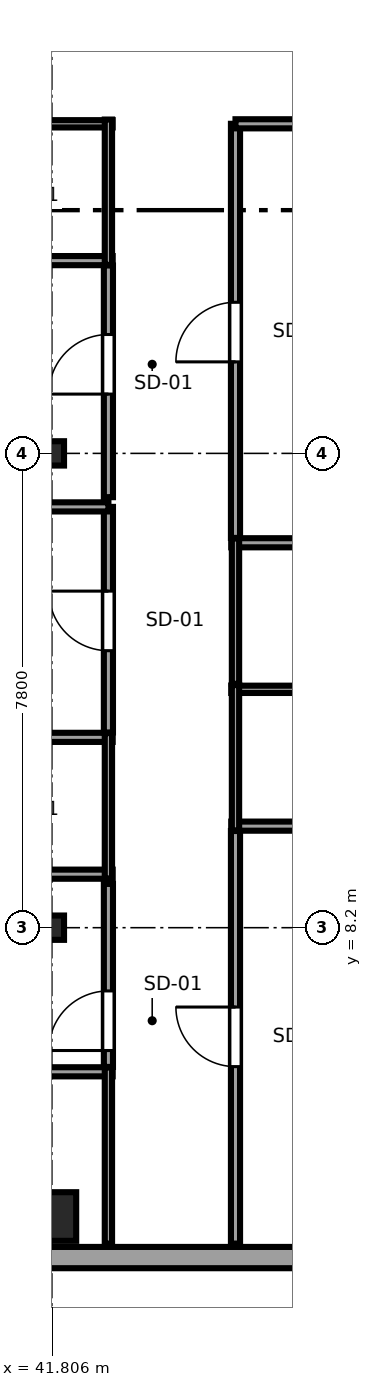
"""IFC4 building model, lengths in metres.
Left out: names, types, materials, properties, quantities, classifications, styles, units other than length and angle.
Written with IfcOpenShell. Run it as: python <this file> out.ifc"""

import sys

from ifc_helpers import new_model, si_unit, direction, frame, frame_2d, origin, origin_2d, place, context, subcontext, project, spatial, rectangle, i_section, extrude, source, transform, mapped, element, fill, save


model = new_model("IFC4")
c1 = context("Model", 3, precision=1e-05, world=origin(), true_north=direction((0.0, 1.0)))
c2 = subcontext(c1, "Body", "Model", "MODEL_VIEW")
j1 = project(units=[si_unit("LENGTHUNIT", "METRE"), si_unit("PLANEANGLEUNIT", "RADIAN")], contexts=[c1])
p1 = place(None, origin())
s1 = spatial("IfcSite", under=j1, at=p1, CompositionType="ELEMENT")
p2 = place(p1, origin())
s2 = spatial("IfcBuilding", under=s1, at=p2, CompositionType="ELEMENT")
p3 = place(p2, frame((0.0, 0.0, 198.2)))
s3 = spatial("IfcBuildingStorey", under=s2, at=p3, CompositionType="ELEMENT", Elevation=198.2)
m1 = source(origin(), c2, "Body", "SweptSolid", [
    extrude(rectangle(XDim=0.8, YDim=0.8, at=origin_2d()), origin(), (0.0, 0.0, 1.0), 3.55),
])
p4 = place(p3, frame((41.8, 3.45, 0.0), z_axis=(0.0, 0.0, 1.0), x_axis=(1.0, 0.0, 0.0)))
e1 = element("IfcColumn", 1, at=p4, inside=s3, PredefinedType="COLUMN", context=c2, shape_type="MappedRepresentation", body=[
    mapped(m1, transform((0.0, 0.0, 0.0), x_axis=(1.0, 0.0, 0.0), y_axis=(0.0, 1.0, 0.0), z_axis=(0.0, 0.0, 1.0), scale=1.0)),
])
m2 = source(origin(), c2, "Body", "SweptSolid", [
    extrude(i_section(OverallWidth=0.4, OverallDepth=0.4, WebThickness=0.02, FlangeThickness=0.035, at=origin_2d()), origin(), (0.0, 0.0, 1.0), 3.55),
])
for number, where, z_axis, x_axis in (
    (2, (41.8, 8.2, 0.0), (0.0, 0.0, 1.0), (1.0, 0.0, 0.0)),
    (3, (41.8, 16.0, 0.0), (0.0, 0.0, 1.0), (1.0, 0.0, 0.0)),
):
    element("IfcColumn", number, at=place(p3, frame(where, z_axis=z_axis, x_axis=x_axis)), inside=s3, PredefinedType="COLUMN", context=c2, shape_type="MappedRepresentation", body=[
        mapped(m2, transform((0.0, 0.0, 0.0), x_axis=(1.0, 0.0, 0.0), y_axis=(0.0, 1.0, 0.0), z_axis=(0.0, 0.0, 1.0), scale=1.0)),
    ])
p5 = place(p3, frame((34.375, 2.775, 0.0), z_axis=(0.0, 0.0, 1.0), x_axis=(1.0, 0.0, 0.0)))
e4 = element("IfcWall", 4, at=p5, inside=s3, PredefinedType="SOLIDWALL", context=c2, shape_type="SweptSolid", body=[
    extrude(rectangle(XDim=15.608, YDim=0.35, at=frame_2d((7.804, 0.0))), origin(), (0.0, 0.0, 1.0), 3.37),
])
p6 = place(p5, frame((1.801, 0.0, 0.68)))
e5 = element("IfcOpeningElement", 5, at=p6, cuts=e4, PredefinedType="OPENING", context=c2, shape_type="SweptSolid", body=[
    extrude(rectangle(XDim=2.4, YDim=1.9, at=frame_2d((1.2, 0.95))), frame((0.0, 0.185, 0.0), z_axis=(0.0, -1.0, 0.0), x_axis=(1.0, 0.0, 0.0)), (0.0, 0.0, 1.0), 0.37),
])
p7 = place(p5, frame((11.406, 0.0, 0.68)))
e6 = element("IfcOpeningElement", 6, at=p7, cuts=e4, PredefinedType="OPENING", context=c2, shape_type="SweptSolid", body=[
    extrude(rectangle(XDim=2.4, YDim=1.9, at=frame_2d((1.2, 0.95))), frame((0.0, 0.185, 0.0), z_axis=(0.0, -1.0, 0.0), x_axis=(1.0, 0.0, 0.0)), (0.0, 0.0, 1.0), 0.37),
])
p8 = place(p3, frame((39.06, 5.83, 0.0), z_axis=(0.0, 0.0, 1.0), x_axis=(1.0, 0.0, 0.0)))
e7 = element("IfcWall", 7, at=p8, inside=s3, PredefinedType="PARTITIONING", context=c2, shape_type="SweptSolid", body=[
    extrude(rectangle(XDim=3.74, YDim=0.15, at=frame_2d((1.87, 0.0))), origin(), (0.0, 0.0, 1.0), 3.37),
])
p9 = place(p3, frame((42.73, 3.005, 0.0), z_axis=(0.0, 0.0, 1.0), x_axis=(0.0, 1.0, 0.0)))
e8 = element("IfcWall", 8, at=p9, inside=s3, PredefinedType="PLUMBINGWALL", context=c2, shape_type="SweptSolid", body=[
    extrude(rectangle(XDim=2.895, YDim=0.12, at=frame_2d((1.448, 0.0))), origin(), (0.0, 0.0, 1.0), 3.37),
])
p10 = place(p3, frame((34.65, 9.08, 0.0), z_axis=(0.0, 0.0, 1.0), x_axis=(1.0, 0.0, 0.0)))
e9 = element("IfcWall", 9, at=p10, inside=s3, PredefinedType="PARTITIONING", context=c2, shape_type="SweptSolid", body=[
    extrude(rectangle(XDim=8.15, YDim=0.15, at=frame_2d((4.075, 0.0))), origin(), (0.0, 0.0, 1.0), 3.37),
])
p11 = place(p3, frame((40.21, 11.33, 0.0), z_axis=(0.0, 0.0, 1.0), x_axis=(1.0, 0.0, 0.0)))
e10 = element("IfcWall", 10, at=p11, inside=s3, PredefinedType="PARTITIONING", context=c2, shape_type="SweptSolid", body=[
    extrude(rectangle(XDim=2.59, YDim=0.15, at=frame_2d((1.295, 0.0))), origin(), (0.0, 0.0, 1.0), 3.37),
])
p12 = place(p3, frame((42.73, 9.01, 0.0), z_axis=(0.0, 0.0, 1.0), x_axis=(0.0, 1.0, 0.0)))
e11 = element("IfcWall", 11, at=p12, inside=s3, PredefinedType="PLUMBINGWALL", context=c2, shape_type="SweptSolid", body=[
    extrude(rectangle(XDim=2.39, YDim=0.12, at=frame_2d((1.195, 0.0))), origin(), (0.0, 0.0, 1.0), 3.37),
])
p13 = place(p3, frame((40.21, 19.17, 0.0), z_axis=(0.0, 0.0, 1.0), x_axis=(1.0, 0.0, 0.0)))
e12 = element("IfcWall", 12, at=p13, inside=s3, PredefinedType="PARTITIONING", context=c2, shape_type="SweptSolid", body=[
    extrude(rectangle(XDim=2.59, YDim=0.15, at=frame_2d((1.295, 0.0))), origin(), (0.0, 0.0, 1.0), 3.37),
])
p14 = place(p3, frame((40.21, 21.42, 0.0), z_axis=(0.0, 0.0, 1.0), x_axis=(1.0, 0.0, 0.0)))
e13 = element("IfcWall", 13, at=p14, inside=s3, PredefinedType="PLUMBINGWALL", context=c2, shape_type="SweptSolid", body=[
    extrude(rectangle(XDim=2.59, YDim=0.12, at=frame_2d((1.295, 0.0))), origin(), (0.0, 0.0, 1.0), 3.37),
])
p15 = place(p3, frame((42.73, 19.1, 0.0), z_axis=(0.0, 0.0, 1.0), x_axis=(0.0, 1.0, 0.0)))
e14 = element("IfcWall", 14, at=p15, inside=s3, PredefinedType="PLUMBINGWALL", context=c2, shape_type="SweptSolid", body=[
    extrude(rectangle(XDim=2.39, YDim=0.12, at=frame_2d((1.195, 0.0))), origin(), (0.0, 0.0, 1.0), 3.37),
])
p16 = place(p3, frame((44.75, 9.87, 0.0), z_axis=(0.0, 0.0, 1.0), x_axis=(1.0, 0.0, 0.0)))
e15 = element("IfcWall", 15, at=p16, inside=s3, PredefinedType="PARTITIONING", context=c2, shape_type="SweptSolid", body=[
    extrude(rectangle(XDim=2.59, YDim=0.15, at=frame_2d((1.295, 0.0))), origin(), (0.0, 0.0, 1.0), 3.37),
])
p17 = place(p3, frame((44.75, 12.12, 0.0), z_axis=(0.0, 0.0, 1.0), x_axis=(1.0, 0.0, 0.0)))
e16 = element("IfcWall", 16, at=p17, inside=s3, PredefinedType="PLUMBINGWALL", context=c2, shape_type="SweptSolid", body=[
    extrude(rectangle(XDim=2.59, YDim=0.12, at=frame_2d((1.295, 0.0))), origin(), (0.0, 0.0, 1.0), 3.37),
])
p18 = place(p3, frame((44.82, 9.8, 0.0), z_axis=(0.0, 0.0, 1.0), x_axis=(0.0, 1.0, 0.0)))
e17 = element("IfcWall", 17, at=p18, inside=s3, PredefinedType="PLUMBINGWALL", context=c2, shape_type="SweptSolid", body=[
    extrude(rectangle(XDim=2.39, YDim=0.12, at=frame_2d((1.195, 0.0))), origin(), (0.0, 0.0, 1.0), 3.37),
])
p19 = place(p3, frame((44.75, 14.53, 0.0), z_axis=(0.0, 0.0, 1.0), x_axis=(1.0, 0.0, 0.0)))
e18 = element("IfcWall", 18, at=p19, inside=s3, PredefinedType="PARTITIONING", context=c2, shape_type="SweptSolid", body=[
    extrude(rectangle(XDim=2.59, YDim=0.15, at=frame_2d((1.295, 0.0))), origin(), (0.0, 0.0, 1.0), 3.37),
])
p20 = place(p3, frame((44.82, 12.21, 0.0), z_axis=(0.0, 0.0, 1.0), x_axis=(0.0, 1.0, 0.0)))
e19 = element("IfcWall", 19, at=p20, inside=s3, PredefinedType="PLUMBINGWALL", context=c2, shape_type="SweptSolid", body=[
    extrude(rectangle(XDim=2.39, YDim=0.12, at=frame_2d((1.195, 0.0))), origin(), (0.0, 0.0, 1.0), 3.37),
])
p21 = place(p3, frame((42.73, 5.91, 0.0), z_axis=(0.0, 0.0, 1.0), x_axis=(0.0, 1.0, 0.0)))
e20 = element("IfcWall", 20, at=p21, inside=s3, PredefinedType="PARTITIONING", context=c2, shape_type="SweptSolid", body=[
    extrude(rectangle(XDim=3.01, YDim=0.15, at=frame_2d((1.505, 0.0))), origin(), (0.0, 0.0, 1.0), 3.37),
])
p22 = place(p21, frame((0.27, 0.0, 0.0)))
e21 = element("IfcOpeningElement", 21, at=p22, cuts=e20, PredefinedType="OPENING", context=c2, shape_type="SweptSolid", body=[
    extrude(rectangle(XDim=0.98, YDim=2.12, at=frame_2d((0.49, 1.06))), frame((0.0, 0.085, 0.0), z_axis=(0.0, -1.0, 0.0), x_axis=(1.0, 0.0, 0.0)), (0.0, 0.0, 1.0), 0.17),
])
p23 = place(p3, frame((42.73, 11.41, 0.0), z_axis=(0.0, 0.0, 1.0), x_axis=(0.0, 1.0, 0.0)))
e22 = element("IfcWall", 22, at=p23, inside=s3, PredefinedType="PARTITIONING", context=c2, shape_type="SweptSolid", body=[
    extrude(rectangle(XDim=3.71, YDim=0.15, at=frame_2d((1.855, 0.0))), origin(), (0.0, 0.0, 1.0), 3.37),
])
p24 = place(p23, frame((1.345, 0.0, 0.0)))
e23 = element("IfcOpeningElement", 23, at=p24, cuts=e22, PredefinedType="OPENING", context=c2, shape_type="SweptSolid", body=[
    extrude(rectangle(XDim=0.98, YDim=2.12, at=frame_2d((0.49, 1.06))), frame((0.0, 0.085, 0.0), z_axis=(0.0, -1.0, 0.0), x_axis=(1.0, 0.0, 0.0)), (0.0, 0.0, 1.0), 0.17),
])
p25 = place(p3, frame((34.65, 15.12, 0.0), z_axis=(0.0, 0.0, 1.0), x_axis=(1.0, 0.0, 0.0)))
e24 = element("IfcWall", 24, at=p25, inside=s3, PredefinedType="PARTITIONING", context=c2, shape_type="SweptSolid", body=[
    extrude(rectangle(XDim=8.08, YDim=0.15, at=frame_2d((4.04, 0.0))), origin(), (0.0, 0.0, 1.0), 3.37),
])
p26 = place(p3, frame((42.73, 15.28, 0.0), z_axis=(0.0, 0.0, 1.0), x_axis=(0.0, 1.0, 0.0)))
e25 = element("IfcWall", 25, at=p26, inside=s3, PredefinedType="PARTITIONING", context=c2, shape_type="SweptSolid", body=[
    extrude(rectangle(XDim=3.81, YDim=0.15, at=frame_2d((1.905, 0.0))), origin(), (0.0, 0.0, 1.0), 3.37),
])
p27 = place(p26, frame((1.695, 0.0, 0.0)))
e26 = element("IfcOpeningElement", 26, at=p27, cuts=e25, PredefinedType="OPENING", context=c2, shape_type="SweptSolid", body=[
    extrude(rectangle(XDim=0.98, YDim=2.12, at=frame_2d((0.49, 1.06))), frame((0.0, 0.085, 0.0), z_axis=(0.0, -1.0, 0.0), x_axis=(1.0, 0.0, 0.0)), (0.0, 0.0, 1.0), 0.17),
])
p28 = place(p3, frame((44.82, 3.005, 0.0), z_axis=(0.0, 0.0, 1.0), x_axis=(0.0, 1.0, 0.0)))
e27 = element("IfcWall", 27, at=p28, inside=s3, PredefinedType="PARTITIONING", context=c2, shape_type="SweptSolid", body=[
    extrude(rectangle(XDim=6.785, YDim=0.15, at=frame_2d((3.393, 0.0))), origin(), (0.0, 0.0, 1.0), 3.37),
])
p29 = place(p28, frame((2.91, 0.0, 0.0)))
e28 = element("IfcOpeningElement", 28, at=p29, cuts=e27, PredefinedType="OPENING", context=c2, shape_type="SweptSolid", body=[
    extrude(rectangle(XDim=0.98, YDim=2.12, at=frame_2d((0.49, 1.06))), frame((0.0, 0.085, 0.0), z_axis=(0.0, -1.0, 0.0), x_axis=(1.0, 0.0, 0.0)), (0.0, 0.0, 1.0), 0.17),
])
p30 = place(p3, frame((44.82, 14.61, 0.0), z_axis=(0.0, 0.0, 1.0), x_axis=(0.0, 1.0, 0.0)))
e29 = element("IfcWall", 29, at=p30, inside=s3, PredefinedType="PARTITIONING", context=c2, shape_type="SweptSolid", body=[
    extrude(rectangle(XDim=6.81, YDim=0.15, at=frame_2d((3.405, 0.0))), origin(), (0.0, 0.0, 1.0), 3.37),
])
p31 = place(p30, frame((2.895, 0.0, 0.0)))
e30 = element("IfcOpeningElement", 30, at=p31, cuts=e29, PredefinedType="OPENING", context=c2, shape_type="SweptSolid", body=[
    extrude(rectangle(XDim=0.98, YDim=2.12, at=frame_2d((0.49, 1.06))), frame((0.0, 0.085, 0.0), z_axis=(0.0, -1.0, 0.0), x_axis=(1.0, 0.0, 0.0)), (0.0, 0.0, 1.0), 0.17),
])
p32 = place(p3, frame((44.82, 21.42, 0.0), z_axis=(0.0, 0.0, 1.0), x_axis=(1.0, 0.0, 0.0)))
e31 = element("IfcWall", 31, at=p32, inside=s3, PredefinedType="PARTITIONING", context=c2, shape_type="SweptSolid", body=[
    extrude(rectangle(XDim=9.175, YDim=0.15, at=frame_2d((4.587, 0.0))), origin(), (0.0, 0.0, 1.0), 3.37),
])
m3 = source(origin(), c2, "Body", "SweptSolid", [
    extrude(rectangle(XDim=0.98, YDim=2.12, at=frame_2d((0.49, 1.06))), frame((0.0, 0.025, 0.0), z_axis=(0.0, -1.0, 0.0), x_axis=(1.0, 0.0, 0.0)), (0.0, 0.0, 1.0), 0.05),
])
p33 = place(p22, origin())
e32 = element("IfcDoor", 32, at=p33, inside=s3, OperationType="SINGLE_SWING_LEFT", PredefinedType="DOOR", context=c2, shape_type="MappedRepresentation", body=[
    mapped(m3, transform((0.0, 0.0, 0.0), x_axis=(1.0, 0.0, 0.0), y_axis=(0.0, 1.0, 0.0), z_axis=(0.0, 0.0, 1.0), scale=1.0)),
])
fill(e21, e32)
p34 = place(p24, origin())
e33 = element("IfcDoor", 33, at=p34, inside=s3, OperationType="SINGLE_SWING_RIGHT", PredefinedType="DOOR", context=c2, shape_type="MappedRepresentation", body=[
    mapped(m3, transform((0.0, 0.0, 0.0), x_axis=(1.0, 0.0, 0.0), y_axis=(0.0, 1.0, 0.0), z_axis=(0.0, 0.0, 1.0), scale=1.0)),
])
fill(e23, e33)
p35 = place(p27, origin())
e34 = element("IfcDoor", 34, at=p35, inside=s3, OperationType="SINGLE_SWING_LEFT", PredefinedType="DOOR", context=c2, shape_type="MappedRepresentation", body=[
    mapped(m3, transform((0.0, 0.0, 0.0), x_axis=(1.0, 0.0, 0.0), y_axis=(0.0, 1.0, 0.0), z_axis=(0.0, 0.0, 1.0), scale=1.0)),
])
fill(e26, e34)
p36 = place(p29, origin())
e35 = element("IfcDoor", 35, at=p36, inside=s3, OperationType="SINGLE_SWING_RIGHT", PredefinedType="DOOR", context=c2, shape_type="MappedRepresentation", body=[
    mapped(m3, transform((0.0, 0.0, 0.0), x_axis=(1.0, 0.0, 0.0), y_axis=(0.0, 1.0, 0.0), z_axis=(0.0, 0.0, 1.0), scale=1.0)),
])
fill(e28, e35)
p37 = place(p31, origin())
e36 = element("IfcDoor", 36, at=p37, inside=s3, OperationType="SINGLE_SWING_LEFT", PredefinedType="DOOR", context=c2, shape_type="MappedRepresentation", body=[
    mapped(m3, transform((0.0, 0.0, 0.0), x_axis=(1.0, 0.0, 0.0), y_axis=(0.0, 1.0, 0.0), z_axis=(0.0, 0.0, 1.0), scale=1.0)),
])
fill(e30, e36)
save(model, sys.argv[1])
